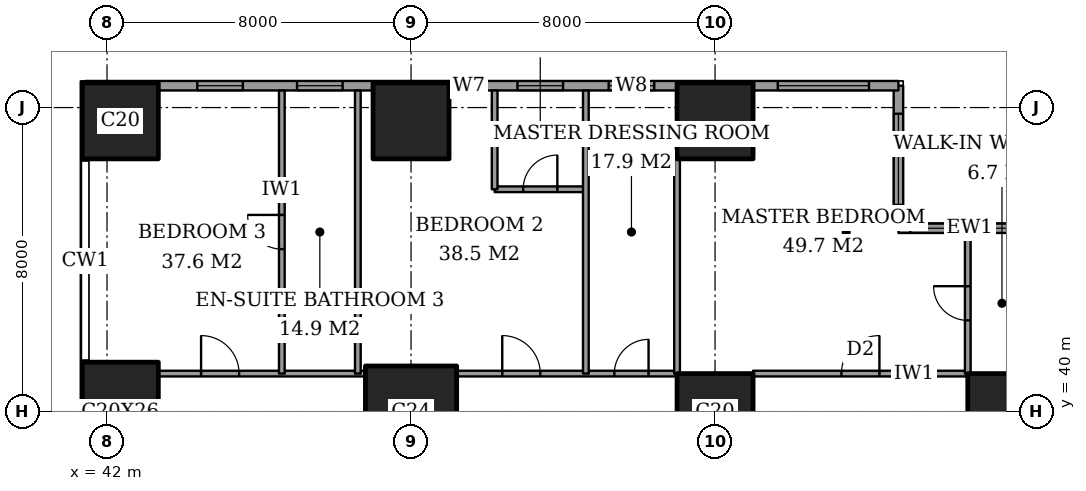
"""IFC4 building model, lengths in metres.
Left out: names, types, materials, properties, quantities, classifications, styles, units other than length and angle.
Written with IfcOpenShell. Run it as: python <this file> out.ifc"""

import sys

from ifc_helpers import new_model, si_unit, direction, frame, frame_2d, origin, origin_2d, place, context, subcontext, project, spatial, rectangle, extrude, element, fill, save


model = new_model("IFC4")
c1 = context("Model", 3, precision=1e-05, world=origin(), true_north=direction((0.0, 1.0)))
c2 = subcontext(c1, "Body", "Model", "MODEL_VIEW")
j1 = project(units=[si_unit("LENGTHUNIT", "METRE"), si_unit("PLANEANGLEUNIT", "RADIAN")], contexts=[c1])
p1 = place(None, origin())
s1 = spatial("IfcSite", under=j1, at=p1, CompositionType="ELEMENT")
p2 = place(p1, origin())
s2 = spatial("IfcBuilding", under=s1, at=p2, CompositionType="ELEMENT")
p3 = place(p2, frame((0.0, 0.0, 83.6)))
s3 = spatial("IfcBuildingStorey", under=s2, at=p3, CompositionType="ELEMENT", Elevation=83.6)
p4 = place(p3, frame((42.35, 40.0, 0.0), z_axis=(0.0, 0.0, 1.0), x_axis=(1.0, 0.0, 0.0)))
e1 = element("IfcColumn", 1, at=p4, inside=s3, PredefinedType="COLUMN", context=c2, shape_type="SweptSolid", body=[
    extrude(rectangle(XDim=2.0, YDim=2.6, at=origin_2d()), origin(), (0.0, 0.0, 1.0), 3.6),
])
p5 = place(p3, frame((42.35, 47.65, 0.0), z_axis=(0.0, 0.0, 1.0), x_axis=(1.0, 0.0, 0.0)))
e2 = element("IfcColumn", 2, at=p5, inside=s3, PredefinedType="COLUMN", context=c2, shape_type="SweptSolid", body=[
    extrude(rectangle(XDim=2.0, YDim=2.0, at=origin_2d()), origin(), (0.0, 0.0, 1.0), 3.6),
])
p6 = place(p3, frame((50.0, 40.0, 0.0), z_axis=(0.0, 0.0, 1.0), x_axis=(1.0, 0.0, 0.0)))
e3 = element("IfcColumn", 3, at=p6, inside=s3, PredefinedType="COLUMN", context=c2, shape_type="SweptSolid", body=[
    extrude(rectangle(XDim=2.4, YDim=2.4, at=origin_2d()), origin(), (0.0, 0.0, 1.0), 3.6),
])
for number, where, z_axis, x_axis in (
    (4, (50.0, 47.65, 0.0), (0.0, 0.0, 1.0), (1.0, 0.0, 0.0)),
    (5, (58.0, 40.0, 0.0), (0.0, 0.0, 1.0), (1.0, 0.0, 0.0)),
    (6, (58.0, 47.65, 0.0), (0.0, 0.0, 1.0), (1.0, 0.0, 0.0)),
    (7, (65.65, 40.0, 0.0), (0.0, 0.0, 1.0), (1.0, 0.0, 0.0)),
):
    element("IfcColumn", number, at=place(p3, frame(where, z_axis=z_axis, x_axis=x_axis)), inside=s3, PredefinedType="COLUMN", context=c2, shape_type="SweptSolid", body=[
        extrude(rectangle(XDim=2.0, YDim=2.0, at=origin_2d()), origin(), (0.0, 0.0, 1.0), 3.6),
    ])
p7 = place(p3, frame((66.575, 44.825, 0.0), z_axis=(0.0, 0.0, 1.0), x_axis=(-1.0, 0.0, 0.0)))
e8 = element("IfcWall", 8, at=p7, inside=s3, PredefinedType="SOLIDWALL", context=c2, shape_type="SweptSolid", body=[
    extrude(rectangle(XDim=3.75, YDim=0.25, at=frame_2d((1.875, 0.0))), origin(), (0.0, 0.0, 1.0), 3.6),
])
p8 = place(p7, frame((0.5, 0.0, 0.6)))
e9 = element("IfcOpeningElement", 9, at=p8, cuts=e8, PredefinedType="OPENING", context=c2, shape_type="SweptSolid", body=[
    extrude(rectangle(XDim=1.2, YDim=2.0, at=frame_2d((0.6, 1.0))), frame((0.0, 0.135, 0.0), z_axis=(0.0, -1.0, 0.0), x_axis=(1.0, 0.0, 0.0)), (0.0, 0.0, 1.0), 0.27),
])
p9 = place(p7, frame((2.238, 0.0, 0.6)))
e10 = element("IfcOpeningElement", 10, at=p9, cuts=e8, PredefinedType="OPENING", context=c2, shape_type="SweptSolid", body=[
    extrude(rectangle(XDim=1.2, YDim=2.0, at=frame_2d((0.6, 1.0))), frame((0.0, 0.135, 0.0), z_axis=(0.0, -1.0, 0.0), x_axis=(1.0, 0.0, 0.0)), (0.0, 0.0, 1.0), 0.27),
])
p10 = place(p3, frame((62.825, 44.825, 0.0), z_axis=(0.0, 0.0, 1.0), x_axis=(0.0, 1.0, 0.0)))
e11 = element("IfcWall", 11, at=p10, inside=s3, PredefinedType="SOLIDWALL", context=c2, shape_type="SweptSolid", body=[
    extrude(rectangle(XDim=3.75, YDim=0.25, at=frame_2d((1.875, 0.0))), origin(), (0.0, 0.0, 1.0), 3.6),
])
p11 = place(p10, frame((0.613, 0.0, 0.6)))
e12 = element("IfcOpeningElement", 12, at=p11, cuts=e11, PredefinedType="OPENING", context=c2, shape_type="SweptSolid", body=[
    extrude(rectangle(XDim=2.4, YDim=2.0, at=frame_2d((1.2, 1.0))), frame((0.0, 0.135, 0.0), z_axis=(0.0, -1.0, 0.0), x_axis=(1.0, 0.0, 0.0)), (0.0, 0.0, 1.0), 0.27),
])
p12 = place(p3, frame((62.825, 48.575, 0.0), z_axis=(0.0, 0.0, 1.0), x_axis=(-1.0, 0.0, 0.0)))
e13 = element("IfcWall", 13, at=p12, inside=s3, PredefinedType="SOLIDWALL", context=c2, shape_type="SweptSolid", body=[
    extrude(rectangle(XDim=21.4, YDim=0.25, at=frame_2d((10.7, 0.0))), origin(), (0.0, 0.0, 1.0), 3.6),
])
p13 = place(p12, frame((0.775, 0.0, 0.6)))
e14 = element("IfcOpeningElement", 14, at=p13, cuts=e13, PredefinedType="OPENING", context=c2, shape_type="SweptSolid", body=[
    extrude(rectangle(XDim=2.4, YDim=2.0, at=frame_2d((1.2, 1.0))), frame((0.0, 0.135, 0.0), z_axis=(0.0, -1.0, 0.0), x_axis=(1.0, 0.0, 0.0)), (0.0, 0.0, 1.0), 0.27),
])
p14 = place(p12, frame((6.425, 0.0, 0.6)))
e15 = element("IfcOpeningElement", 15, at=p14, cuts=e13, PredefinedType="OPENING", context=c2, shape_type="SweptSolid", body=[
    extrude(rectangle(XDim=1.2, YDim=2.0, at=frame_2d((0.6, 1.0))), frame((0.0, 0.135, 0.0), z_axis=(0.0, -1.0, 0.0), x_axis=(1.0, 0.0, 0.0)), (0.0, 0.0, 1.0), 0.27),
])
p15 = place(p12, frame((8.825, 0.0, 0.6)))
e16 = element("IfcOpeningElement", 16, at=p15, cuts=e13, PredefinedType="OPENING", context=c2, shape_type="SweptSolid", body=[
    extrude(rectangle(XDim=1.2, YDim=2.0, at=frame_2d((0.6, 1.0))), frame((0.0, 0.135, 0.0), z_axis=(0.0, -1.0, 0.0), x_axis=(1.0, 0.0, 0.0)), (0.0, 0.0, 1.0), 0.27),
])
p16 = place(p12, frame((11.0, 0.0, 0.6)))
e17 = element("IfcOpeningElement", 17, at=p16, cuts=e13, PredefinedType="OPENING", context=c2, shape_type="SweptSolid", body=[
    extrude(rectangle(XDim=0.6, YDim=2.0, at=frame_2d((0.3, 1.0))), frame((0.0, 0.135, 0.0), z_axis=(0.0, -1.0, 0.0), x_axis=(1.0, 0.0, 0.0)), (0.0, 0.0, 1.0), 0.27),
])
p17 = place(p12, frame((14.625, 0.0, 0.6)))
e18 = element("IfcOpeningElement", 18, at=p17, cuts=e13, PredefinedType="OPENING", context=c2, shape_type="SweptSolid", body=[
    extrude(rectangle(XDim=1.2, YDim=2.0, at=frame_2d((0.6, 1.0))), frame((0.0, 0.135, 0.0), z_axis=(0.0, -1.0, 0.0), x_axis=(1.0, 0.0, 0.0)), (0.0, 0.0, 1.0), 0.27),
])
p18 = place(p12, frame((17.25, 0.0, 0.6)))
e19 = element("IfcOpeningElement", 19, at=p18, cuts=e13, PredefinedType="OPENING", context=c2, shape_type="SweptSolid", body=[
    extrude(rectangle(XDim=1.2, YDim=2.0, at=frame_2d((0.6, 1.0))), frame((0.0, 0.135, 0.0), z_axis=(0.0, -1.0, 0.0), x_axis=(1.0, 0.0, 0.0)), (0.0, 0.0, 1.0), 0.27),
])
p19 = place(p3, frame((43.35, 41.0, 0.0), z_axis=(0.0, 0.0, 1.0), x_axis=(1.0, 0.0, 0.0)))
e20 = element("IfcWall", 20, at=p19, inside=s3, PredefinedType="PARTITIONING", context=c2, shape_type="SweptSolid", body=[
    extrude(rectangle(XDim=5.45, YDim=0.15, at=frame_2d((2.725, 0.0))), origin(), (0.0, 0.0, 1.0), 3.35),
])
p20 = place(p19, frame((1.125, 0.0, 0.0)))
e21 = element("IfcOpeningElement", 21, at=p20, cuts=e20, PredefinedType="OPENING", context=c2, shape_type="SweptSolid", body=[
    extrude(rectangle(XDim=1.0, YDim=2.1, at=frame_2d((0.5, 1.05))), frame((0.0, 0.085, 0.0), z_axis=(0.0, -1.0, 0.0), x_axis=(1.0, 0.0, 0.0)), (0.0, 0.0, 1.0), 0.17),
])
p21 = place(p3, frame((51.2, 41.0, 0.0), z_axis=(0.0, 0.0, 1.0), x_axis=(1.0, 0.0, 0.0)))
e22 = element("IfcWall", 22, at=p21, inside=s3, PredefinedType="PARTITIONING", context=c2, shape_type="SweptSolid", body=[
    extrude(rectangle(XDim=5.8, YDim=0.15, at=frame_2d((2.9, 0.0))), origin(), (0.0, 0.0, 1.0), 3.35),
])
p22 = place(p21, frame((4.15, 0.0, 0.0)))
e23 = element("IfcOpeningElement", 23, at=p22, cuts=e22, PredefinedType="OPENING", context=c2, shape_type="SweptSolid", body=[
    extrude(rectangle(XDim=0.9, YDim=2.1, at=frame_2d((0.45, 1.05))), frame((0.0, 0.085, 0.0), z_axis=(0.0, -1.0, 0.0), x_axis=(1.0, 0.0, 0.0)), (0.0, 0.0, 1.0), 0.17),
])
p23 = place(p21, frame((1.2, 0.0, 0.0)))
e24 = element("IfcOpeningElement", 24, at=p23, cuts=e22, PredefinedType="OPENING", context=c2, shape_type="SweptSolid", body=[
    extrude(rectangle(XDim=1.0, YDim=2.1, at=frame_2d((0.5, 1.05))), frame((0.0, 0.085, 0.0), z_axis=(0.0, -1.0, 0.0), x_axis=(1.0, 0.0, 0.0)), (0.0, 0.0, 1.0), 0.17),
])
p24 = place(p3, frame((59.0, 41.0, 0.0), z_axis=(0.0, 0.0, 1.0), x_axis=(1.0, 0.0, 0.0)))
e25 = element("IfcWall", 25, at=p24, inside=s3, PredefinedType="PARTITIONING", context=c2, shape_type="SweptSolid", body=[
    extrude(rectangle(XDim=5.65, YDim=0.15, at=frame_2d((2.825, 0.0))), origin(), (0.0, 0.0, 1.0), 3.35),
])
p25 = place(p24, frame((2.325, 0.0, 0.0)))
e26 = element("IfcOpeningElement", 26, at=p25, cuts=e25, PredefinedType="OPENING", context=c2, shape_type="SweptSolid", body=[
    extrude(rectangle(XDim=1.0, YDim=2.1, at=frame_2d((0.5, 1.05))), frame((0.0, 0.085, 0.0), z_axis=(0.0, -1.0, 0.0), x_axis=(1.0, 0.0, 0.0)), (0.0, 0.0, 1.0), 0.17),
])
p26 = place(p3, frame((52.2, 45.85, 0.0), z_axis=(0.0, 0.0, 1.0), x_axis=(1.0, 0.0, 0.0)))
e27 = element("IfcWall", 27, at=p26, inside=s3, PredefinedType="PARTITIONING", context=c2, shape_type="SweptSolid", body=[
    extrude(rectangle(XDim=2.4, YDim=0.15, at=frame_2d((1.2, 0.0))), origin(), (0.0, 0.0, 1.0), 3.35),
])
p27 = place(p26, frame((0.75, 0.0, 0.0)))
e28 = element("IfcOpeningElement", 28, at=p27, cuts=e27, PredefinedType="OPENING", context=c2, shape_type="SweptSolid", body=[
    extrude(rectangle(XDim=0.9, YDim=2.1, at=frame_2d((0.45, 1.05))), frame((0.0, 0.085, 0.0), z_axis=(0.0, -1.0, 0.0), x_axis=(1.0, 0.0, 0.0)), (0.0, 0.0, 1.0), 0.17),
])
p28 = place(p3, frame((46.6, 41.0, 0.0), z_axis=(0.0, 0.0, 1.0), x_axis=(0.0, 1.0, 0.0)))
e29 = element("IfcWall", 29, at=p28, inside=s3, PredefinedType="PARTITIONING", context=c2, shape_type="SweptSolid", body=[
    extrude(rectangle(XDim=7.45, YDim=0.15, at=frame_2d((3.725, 0.0))), origin(), (0.0, 0.0, 1.0), 3.35),
])
p29 = place(p28, frame((3.275, 0.0, 0.0)))
e30 = element("IfcOpeningElement", 30, at=p29, cuts=e29, PredefinedType="OPENING", context=c2, shape_type="SweptSolid", body=[
    extrude(rectangle(XDim=0.9, YDim=2.1, at=frame_2d((0.45, 1.05))), frame((0.0, 0.085, 0.0), z_axis=(0.0, -1.0, 0.0), x_axis=(1.0, 0.0, 0.0)), (0.0, 0.0, 1.0), 0.17),
])
p30 = place(p3, frame((48.6, 41.0, 0.0), z_axis=(0.0, 0.0, 1.0), x_axis=(0.0, 1.0, 0.0)))
e31 = element("IfcWall", 31, at=p30, inside=s3, PredefinedType="PARTITIONING", context=c2, shape_type="SweptSolid", body=[
    extrude(rectangle(XDim=7.45, YDim=0.15, at=frame_2d((3.725, 0.0))), origin(), (0.0, 0.0, 1.0), 3.35),
])
p31 = place(p3, frame((52.2, 45.85, 0.0), z_axis=(0.0, 0.0, 1.0), x_axis=(0.0, 1.0, 0.0)))
e32 = element("IfcWall", 32, at=p31, inside=s3, PredefinedType="PARTITIONING", context=c2, shape_type="SweptSolid", body=[
    extrude(rectangle(XDim=2.6, YDim=0.15, at=frame_2d((1.3, 0.0))), origin(), (0.0, 0.0, 1.0), 3.35),
])
p32 = place(p3, frame((54.6, 41.0, 0.0), z_axis=(0.0, 0.0, 1.0), x_axis=(0.0, 1.0, 0.0)))
e33 = element("IfcWall", 33, at=p32, inside=s3, PredefinedType="PARTITIONING", context=c2, shape_type="SweptSolid", body=[
    extrude(rectangle(XDim=7.45, YDim=0.15, at=frame_2d((3.725, 0.0))), origin(), (0.0, 0.0, 1.0), 3.35),
])
p33 = place(p3, frame((57.0, 41.0, 0.0), z_axis=(0.0, 0.0, 1.0), x_axis=(0.0, 1.0, 0.0)))
e34 = element("IfcWall", 34, at=p33, inside=s3, PredefinedType="PARTITIONING", context=c2, shape_type="SweptSolid", body=[
    extrude(rectangle(XDim=5.65, YDim=0.15, at=frame_2d((2.825, 0.0))), origin(), (0.0, 0.0, 1.0), 3.35),
])
p34 = place(p3, frame((64.65, 41.0, 0.0), z_axis=(0.0, 0.0, 1.0), x_axis=(0.0, 1.0, 0.0)))
e35 = element("IfcWall", 35, at=p34, inside=s3, PredefinedType="PARTITIONING", context=c2, shape_type="SweptSolid", body=[
    extrude(rectangle(XDim=3.7, YDim=0.15, at=frame_2d((1.85, 0.0))), origin(), (0.0, 0.0, 1.0), 3.35),
])
p35 = place(p34, frame((1.4, 0.0, 0.0)))
e36 = element("IfcOpeningElement", 36, at=p35, cuts=e35, PredefinedType="OPENING", context=c2, shape_type="SweptSolid", body=[
    extrude(rectangle(XDim=0.9, YDim=2.1, at=frame_2d((0.45, 1.05))), frame((0.0, 0.085, 0.0), z_axis=(0.0, -1.0, 0.0), x_axis=(1.0, 0.0, 0.0)), (0.0, 0.0, 1.0), 0.17),
])
p36 = place(p8, origin())
e37 = element("IfcWindow", 37, at=p36, inside=s3, PartitioningType="SINGLE_PANEL", PredefinedType="WINDOW", context=c2, shape_type="SweptSolid", body=[
    extrude(rectangle(XDim=1.2, YDim=2.0, at=frame_2d((0.6, 1.0))), frame((0.0, 0.03, 0.0), z_axis=(0.0, -1.0, 0.0), x_axis=(1.0, 0.0, 0.0)), (0.0, 0.0, 1.0), 0.06),
])
fill(e9, e37)
p37 = place(p9, origin())
e38 = element("IfcWindow", 38, at=p37, inside=s3, PartitioningType="SINGLE_PANEL", PredefinedType="WINDOW", context=c2, shape_type="SweptSolid", body=[
    extrude(rectangle(XDim=1.2, YDim=2.0, at=frame_2d((0.6, 1.0))), frame((0.0, 0.03, 0.0), z_axis=(0.0, -1.0, 0.0), x_axis=(1.0, 0.0, 0.0)), (0.0, 0.0, 1.0), 0.06),
])
fill(e10, e38)
p38 = place(p11, origin())
e39 = element("IfcWindow", 39, at=p38, inside=s3, PartitioningType="SINGLE_PANEL", PredefinedType="WINDOW", context=c2, shape_type="SweptSolid", body=[
    extrude(rectangle(XDim=2.4, YDim=2.0, at=frame_2d((1.2, 1.0))), frame((0.0, 0.03, 0.0), z_axis=(0.0, -1.0, 0.0), x_axis=(1.0, 0.0, 0.0)), (0.0, 0.0, 1.0), 0.06),
])
fill(e12, e39)
p39 = place(p13, origin())
e40 = element("IfcWindow", 40, at=p39, inside=s3, PartitioningType="SINGLE_PANEL", PredefinedType="WINDOW", context=c2, shape_type="SweptSolid", body=[
    extrude(rectangle(XDim=2.4, YDim=2.0, at=frame_2d((1.2, 1.0))), frame((0.0, 0.03, 0.0), z_axis=(0.0, -1.0, 0.0), x_axis=(1.0, 0.0, 0.0)), (0.0, 0.0, 1.0), 0.06),
])
fill(e14, e40)
p40 = place(p14, origin())
e41 = element("IfcWindow", 41, at=p40, inside=s3, PartitioningType="SINGLE_PANEL", PredefinedType="WINDOW", context=c2, shape_type="SweptSolid", body=[
    extrude(rectangle(XDim=1.2, YDim=2.0, at=frame_2d((0.6, 1.0))), frame((0.0, 0.03, 0.0), z_axis=(0.0, -1.0, 0.0), x_axis=(1.0, 0.0, 0.0)), (0.0, 0.0, 1.0), 0.06),
])
fill(e15, e41)
p41 = place(p15, origin())
e42 = element("IfcWindow", 42, at=p41, inside=s3, PartitioningType="SINGLE_PANEL", PredefinedType="WINDOW", context=c2, shape_type="SweptSolid", body=[
    extrude(rectangle(XDim=1.2, YDim=2.0, at=frame_2d((0.6, 1.0))), frame((0.0, 0.03, 0.0), z_axis=(0.0, -1.0, 0.0), x_axis=(1.0, 0.0, 0.0)), (0.0, 0.0, 1.0), 0.06),
])
fill(e16, e42)
p42 = place(p16, origin())
e43 = element("IfcWindow", 43, at=p42, inside=s3, PartitioningType="SINGLE_PANEL", PredefinedType="WINDOW", context=c2, shape_type="SweptSolid", body=[
    extrude(rectangle(XDim=0.6, YDim=2.0, at=frame_2d((0.3, 1.0))), frame((0.0, 0.03, 0.0), z_axis=(0.0, -1.0, 0.0), x_axis=(1.0, 0.0, 0.0)), (0.0, 0.0, 1.0), 0.06),
])
fill(e17, e43)
p43 = place(p17, origin())
e44 = element("IfcWindow", 44, at=p43, inside=s3, PartitioningType="SINGLE_PANEL", PredefinedType="WINDOW", context=c2, shape_type="SweptSolid", body=[
    extrude(rectangle(XDim=1.2, YDim=2.0, at=frame_2d((0.6, 1.0))), frame((0.0, 0.03, 0.0), z_axis=(0.0, -1.0, 0.0), x_axis=(1.0, 0.0, 0.0)), (0.0, 0.0, 1.0), 0.06),
])
fill(e18, e44)
p44 = place(p18, origin())
e45 = element("IfcWindow", 45, at=p44, inside=s3, PartitioningType="SINGLE_PANEL", PredefinedType="WINDOW", context=c2, shape_type="SweptSolid", body=[
    extrude(rectangle(XDim=1.2, YDim=2.0, at=frame_2d((0.6, 1.0))), frame((0.0, 0.03, 0.0), z_axis=(0.0, -1.0, 0.0), x_axis=(1.0, 0.0, 0.0)), (0.0, 0.0, 1.0), 0.06),
])
fill(e19, e45)
p45 = place(p35, origin())
e46 = element("IfcDoor", 46, at=p45, inside=s3, OperationType="SINGLE_SWING_LEFT", PredefinedType="DOOR", context=c2, shape_type="SweptSolid", body=[
    extrude(rectangle(XDim=0.9, YDim=2.1, at=frame_2d((0.45, 1.05))), frame((0.0, 0.025, 0.0), z_axis=(0.0, -1.0, 0.0), x_axis=(1.0, 0.0, 0.0)), (0.0, 0.0, 1.0), 0.05),
])
fill(e36, e46)
p46 = place(p25, origin())
e47 = element("IfcDoor", 47, at=p46, inside=s3, OperationType="SINGLE_SWING_LEFT", PredefinedType="DOOR", context=c2, shape_type="SweptSolid", body=[
    extrude(rectangle(XDim=1.0, YDim=2.1, at=frame_2d((0.5, 1.05))), frame((0.0, 0.025, 0.0), z_axis=(0.0, -1.0, 0.0), x_axis=(1.0, 0.0, 0.0)), (0.0, 0.0, 1.0), 0.05),
])
fill(e26, e47)
p47 = place(p22, origin())
e48 = element("IfcDoor", 48, at=p47, inside=s3, OperationType="SINGLE_SWING_LEFT", PredefinedType="DOOR", context=c2, shape_type="SweptSolid", body=[
    extrude(rectangle(XDim=0.9, YDim=2.1, at=frame_2d((0.45, 1.05))), frame((0.0, 0.025, 0.0), z_axis=(0.0, -1.0, 0.0), x_axis=(1.0, 0.0, 0.0)), (0.0, 0.0, 1.0), 0.05),
])
fill(e23, e48)
p48 = place(p27, origin())
e49 = element("IfcDoor", 49, at=p48, inside=s3, OperationType="SINGLE_SWING_LEFT", PredefinedType="DOOR", context=c2, shape_type="SweptSolid", body=[
    extrude(rectangle(XDim=0.9, YDim=2.1, at=frame_2d((0.45, 1.05))), frame((0.0, 0.025, 0.0), z_axis=(0.0, -1.0, 0.0), x_axis=(1.0, 0.0, 0.0)), (0.0, 0.0, 1.0), 0.05),
])
fill(e28, e49)
p49 = place(p23, origin())
e50 = element("IfcDoor", 50, at=p49, inside=s3, OperationType="SINGLE_SWING_RIGHT", PredefinedType="DOOR", context=c2, shape_type="SweptSolid", body=[
    extrude(rectangle(XDim=1.0, YDim=2.1, at=frame_2d((0.5, 1.05))), frame((0.0, 0.025, 0.0), z_axis=(0.0, -1.0, 0.0), x_axis=(1.0, 0.0, 0.0)), (0.0, 0.0, 1.0), 0.05),
])
fill(e24, e50)
p50 = place(p29, origin())
e51 = element("IfcDoor", 51, at=p50, inside=s3, OperationType="SINGLE_SWING_LEFT", PredefinedType="DOOR", context=c2, shape_type="SweptSolid", body=[
    extrude(rectangle(XDim=0.9, YDim=2.1, at=frame_2d((0.45, 1.05))), frame((0.0, 0.025, 0.0), z_axis=(0.0, -1.0, 0.0), x_axis=(1.0, 0.0, 0.0)), (0.0, 0.0, 1.0), 0.05),
])
fill(e30, e51)
p51 = place(p20, origin())
e52 = element("IfcDoor", 52, at=p51, inside=s3, OperationType="SINGLE_SWING_RIGHT", PredefinedType="DOOR", context=c2, shape_type="SweptSolid", body=[
    extrude(rectangle(XDim=1.0, YDim=2.1, at=frame_2d((0.5, 1.05))), frame((0.0, 0.025, 0.0), z_axis=(0.0, -1.0, 0.0), x_axis=(1.0, 0.0, 0.0)), (0.0, 0.0, 1.0), 0.05),
])
fill(e21, e52)
save(model, sys.argv[1])
